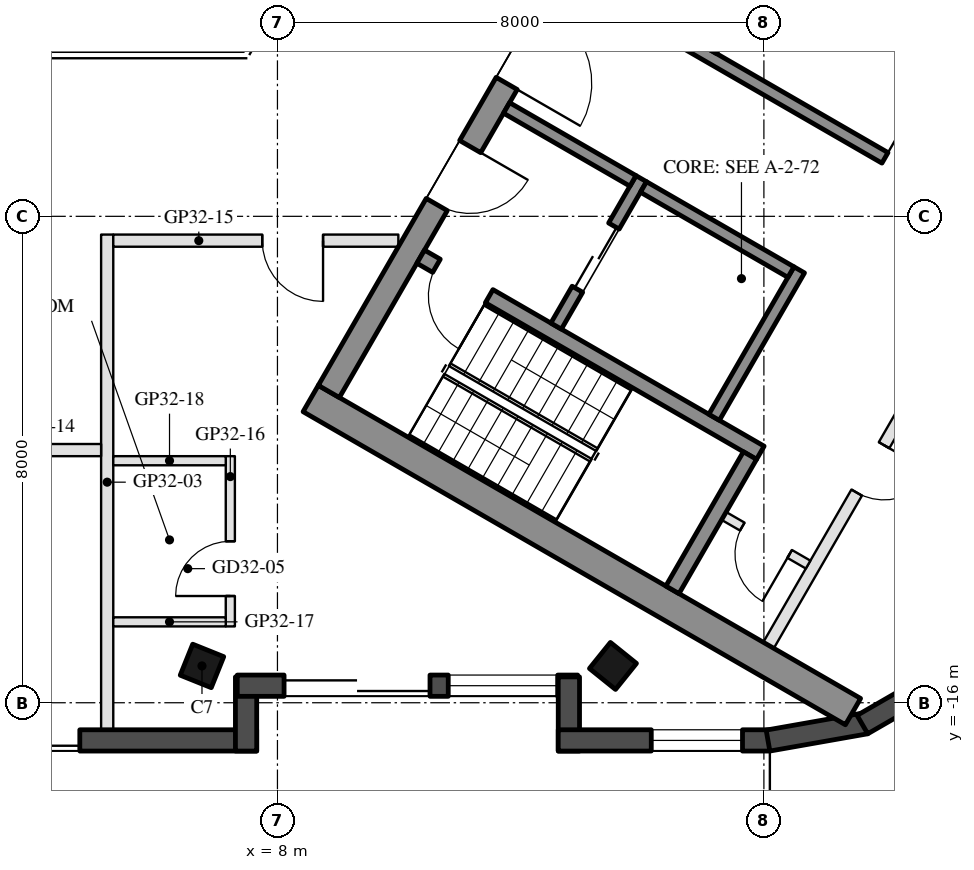
"""IFC4 building model, lengths in metres.
Left out: names, types, materials, properties, quantities, classifications, styles, units other than length and angle.
Written with IfcOpenShell. Run it as: python <this file> out.ifc"""

import sys

from ifc_helpers import new_model, si_unit, direction, frame, frame_2d, origin, origin_2d, place, context, subcontext, project, spatial, rectangle, hollow_rectangle, extrude, boolean, halfspace, element, fill, save


model = new_model("IFC4")
c1 = context("Model", 3, precision=1e-05, world=origin(), true_north=direction((0.0, 1.0)))
c2 = subcontext(c1, "Body", "Model", "MODEL_VIEW")
j1 = project(units=[si_unit("LENGTHUNIT", "METRE"), si_unit("PLANEANGLEUNIT", "RADIAN")], contexts=[c1])
p1 = place(None, origin())
s1 = spatial("IfcSite", under=j1, at=p1, CompositionType="ELEMENT")
p2 = place(p1, origin())
s2 = spatial("IfcBuilding", under=s1, at=p2, CompositionType="ELEMENT")
p3 = place(p2, frame((0.0, 0.0, 309.6)))
s3 = spatial("IfcBuildingStorey", under=s2, at=p3, CompositionType="ELEMENT", Elevation=309.6)
p4 = place(p3, frame((6.759, -15.395, 0.0), z_axis=(-0.060805602285, 0.151232777417, 0.986626234075), x_axis=(0.998137511125, 0.004342411053, 0.060849423591)))
e1 = element("IfcColumn", 1, at=p4, inside=s3, PredefinedType="COLUMN", context=c2, shape_type="SweptSolid", body=[
    boolean("DIFFERENCE", boolean("DIFFERENCE", extrude(hollow_rectangle(XDim=0.55, YDim=0.55, WallThickness=0.025, at=origin_2d()), origin(), (0.0, 0.0, 1.0), 3.75), halfspace(frame((0.0, 0.0, 0.034), z_axis=(0.0, 0.0, 1.0), x_axis=(1.0, 0.0, 0.0)), True)), halfspace(frame((0.0, 0.0, 3.716), z_axis=(0.0, 0.0, 1.0), x_axis=(1.0, 0.0, 0.0)), False)),
])
p5 = place(p3, frame((13.518, -15.395, 0.0), z_axis=(-0.121069901949, 0.150398600122, 0.981184151892), x_axis=(0.992601568988, 0.00920533993, 0.121067695767)))
e2 = element("IfcColumn", 2, at=p5, inside=s3, PredefinedType="COLUMN", context=c2, shape_type="SweptSolid", body=[
    boolean("DIFFERENCE", boolean("DIFFERENCE", extrude(hollow_rectangle(XDim=0.55, YDim=0.55, WallThickness=0.025, at=origin_2d()), origin(), (0.0, 0.0, 1.0), 3.771), halfspace(frame((0.0, 0.0, 0.04), z_axis=(0.0, 0.0, 1.0), x_axis=(1.0, 0.0, 0.0)), True)), halfspace(frame((0.0, 0.0, 3.731), z_axis=(0.0, 0.0, 1.0), x_axis=(1.0, 0.0, 0.0)), False)),
])
p6 = place(p3, frame((-0.9, -16.62, 0.0), z_axis=(0.0, 0.0, 1.0), x_axis=(1.0, 0.0, 0.0)))
e3 = element("IfcWall", 3, at=p6, inside=s3, PredefinedType="SOLIDWALL", context=c2, shape_type="SweptSolid", body=[
    extrude(rectangle(XDim=8.559, YDim=0.35, at=frame_2d((4.279, 0.0))), origin(), (0.0, 0.0, 1.0), 3.55),
])
p7 = place(p6, frame((3.85, 0.0, 0.0)))
e4 = element("IfcOpeningElement", 4, at=p7, cuts=e3, PredefinedType="OPENING", context=c2, shape_type="SweptSolid", body=[
    extrude(rectangle(XDim=1.8, YDim=2.4, at=frame_2d((0.9, 1.2))), frame((0.0, 0.185, 0.0), z_axis=(0.0, -1.0, 0.0), x_axis=(1.0, 0.0, 0.0)), (0.0, 0.0, 1.0), 0.37),
])
p8 = place(p6, frame((1.528, 0.0, 0.3)))
e5 = element("IfcOpeningElement", 5, at=p8, cuts=e3, PredefinedType="OPENING", context=c2, shape_type="SweptSolid", body=[
    extrude(rectangle(XDim=2.0, YDim=2.65, at=frame_2d((1.0, 1.325))), frame((0.0, 0.185, 0.0), z_axis=(0.0, -1.0, 0.0), x_axis=(1.0, 0.0, 0.0)), (0.0, 0.0, 1.0), 0.37),
])
p9 = place(p3, frame((7.484, -16.795, 0.0), z_axis=(0.0, 0.0, 1.0), x_axis=(0.0, 1.0, 0.0)))
e6 = element("IfcWall", 6, at=p9, inside=s3, PredefinedType="SOLIDWALL", context=c2, shape_type="SweptSolid", body=[
    extrude(rectangle(XDim=1.22, YDim=0.35, at=frame_2d((0.61, 0.0))), origin(), (0.0, 0.0, 1.0), 3.55),
])
p10 = place(p3, frame((7.339, -15.719, 0.0), z_axis=(0.0, 0.0, 1.0), x_axis=(1.0, 0.0, 0.0)))
e7 = element("IfcWall", 7, at=p10, inside=s3, PredefinedType="SOLIDWALL", context=c2, shape_type="SweptSolid", body=[
    extrude(rectangle(XDim=5.599, YDim=0.35, at=frame_2d((2.799, 0.0))), origin(), (0.0, 0.0, 1.0), 3.55),
])
p11 = place(p10, frame((0.77, 0.0, 0.0)))
e8 = element("IfcOpeningElement", 8, at=p11, cuts=e7, PredefinedType="OPENING", context=c2, shape_type="SweptSolid", body=[
    extrude(rectangle(XDim=2.4, YDim=2.4, at=frame_2d((1.2, 1.2))), frame((0.0, 0.185, 0.0), z_axis=(0.0, -1.0, 0.0), x_axis=(1.0, 0.0, 0.0)), (0.0, 0.0, 1.0), 0.37),
])
p12 = place(p10, frame((3.47, 0.0, 0.3)))
e9 = element("IfcOpeningElement", 9, at=p12, cuts=e7, PredefinedType="OPENING", context=c2, shape_type="SweptSolid", body=[
    extrude(rectangle(XDim=1.8, YDim=2.65, at=frame_2d((0.9, 1.325))), frame((0.0, 0.185, 0.0), z_axis=(0.0, -1.0, 0.0), x_axis=(1.0, 0.0, 0.0)), (0.0, 0.0, 1.0), 0.37),
])
p13 = place(p3, frame((12.793, -15.575, 0.0), z_axis=(0.0, 0.0, 1.0), x_axis=(0.0, -1.0, 0.0)))
e10 = element("IfcWall", 10, at=p13, inside=s3, PredefinedType="SOLIDWALL", context=c2, shape_type="SweptSolid", body=[
    extrude(rectangle(XDim=1.22, YDim=0.35, at=frame_2d((0.61, 0.0))), origin(), (0.0, 0.0, 1.0), 3.55),
])
p14 = place(p3, frame((12.618, -16.62, 0.0), z_axis=(0.0, 0.0, 1.0), x_axis=(1.0, 0.0, 0.0)))
e11 = element("IfcWall", 11, at=p14, inside=s3, PredefinedType="SOLIDWALL", context=c2, shape_type="SweptSolid", body=[
    extrude(rectangle(XDim=3.48, YDim=0.35, at=frame_2d((1.74, 0.0))), origin(), (0.0, 0.0, 1.0), 3.55),
])
p15 = place(p14, frame((1.53, 0.0, 0.3)))
e12 = element("IfcOpeningElement", 12, at=p15, cuts=e11, PredefinedType="OPENING", context=c2, shape_type="SweptSolid", body=[
    extrude(rectangle(XDim=1.5, YDim=2.65, at=frame_2d((0.75, 1.325))), frame((0.0, 0.185, 0.0), z_axis=(0.0, -1.0, 0.0), x_axis=(1.0, 0.0, 0.0)), (0.0, 0.0, 1.0), 0.37),
])
p16 = place(p3, frame((16.068, -16.622, 0.0), z_axis=(0.0, 0.0, 1.0), x_axis=(0.98479107762, 0.173742721977, 0.0)))
e13 = element("IfcWall", 13, at=p16, inside=s3, PredefinedType="SOLIDWALL", context=c2, shape_type="SweptSolid", body=[
    extrude(rectangle(XDim=1.634, YDim=0.35, at=frame_2d((0.817, 0.0))), origin(), (0.0, 0.0, 1.0), 3.55),
])
p17 = place(p3, frame((17.62, -16.359, 0.0), z_axis=(0.0, 0.0, 1.0), x_axis=(0.866083589932, 0.499899205091, 0.0)))
e14 = element("IfcWall", 14, at=p17, inside=s3, PredefinedType="SOLIDWALL", context=c2, shape_type="SweptSolid", body=[
    extrude(rectangle(XDim=1.634, YDim=0.35, at=frame_2d((0.817, 0.0))), origin(), (0.0, 0.0, 1.0), 3.55),
])
p18 = place(p3, frame((22.442, -5.632, 0.0), z_axis=(0.0, 0.0, 1.0), x_axis=(-0.499983205548, 0.866035099848, 0.0)))
e15 = element("IfcWall", 15, at=p18, inside=s3, PredefinedType="SOLIDWALL", context=c2, shape_type="SweptSolid", body=[
    extrude(rectangle(XDim=10.239, YDim=0.35, at=frame_2d((5.12, 0.0))), origin(), (0.0, 0.0, 1.0), 3.55),
])
p19 = place(p18, frame((6.311, 0.0, 0.0)))
e16 = element("IfcOpeningElement", 16, at=p19, cuts=e15, PredefinedType="OPENING", context=c2, shape_type="SweptSolid", body=[
    extrude(rectangle(XDim=2.4, YDim=2.4, at=frame_2d((1.2, 1.2))), frame((0.0, 0.185, 0.0), z_axis=(0.0, -1.0, 0.0), x_axis=(1.0, 0.0, 0.0)), (0.0, 0.0, 1.0), 0.37),
])
p20 = place(p18, frame((3.667, 0.0, 0.3)))
e17 = element("IfcOpeningElement", 17, at=p20, cuts=e15, PredefinedType="OPENING", context=c2, shape_type="SweptSolid", body=[
    extrude(rectangle(XDim=2.3, YDim=2.65, at=frame_2d((1.15, 1.325))), frame((0.0, 0.185, 0.0), z_axis=(0.0, -1.0, 0.0), x_axis=(1.0, 0.0, 0.0)), (0.0, 0.0, 1.0), 0.37),
])
for number, where, z_axis, x_axis in (
    (18, (8.547, -10.997, 0.0), (0.0, 0.0, 1.0), (0.866, -0.5, 0.0)),
    (19, (13.797, -1.903, 0.0), (0.0, 0.0, 1.0), (0.866, -0.5, 0.0)),
):
    element("IfcWall", number, at=place(p3, frame(where, z_axis=z_axis, x_axis=x_axis)), inside=s3, PredefinedType="SHEAR", context=c2, shape_type="SweptSolid", body=[
        extrude(rectangle(XDim=10.298, YDim=0.5, at=frame_2d((5.149, 0.0))), origin(), (0.0, 0.0, 1.0), 3.5),
    ])
p21 = place(p3, frame((8.845, -10.88, 0.0), z_axis=(0.0, 0.0, 1.0), x_axis=(0.500004234368, 0.866022959057, 0.0)))
e20 = element("IfcWall", 20, at=p21, inside=s3, PredefinedType="SHEAR", context=c2, shape_type="SweptSolid", body=[
    extrude(rectangle(XDim=10.0, YDim=0.4, at=frame_2d((5.0, 0.0))), origin(), (0.0, 0.0, 1.0), 3.5),
])
p22 = place(p21, frame((3.55, 0.0, 0.0)))
e21 = element("IfcOpeningElement", 21, at=p22, cuts=e20, PredefinedType="OPENING", context=c2, shape_type="SweptSolid", body=[
    extrude(rectangle(XDim=1.1, YDim=2.1, at=frame_2d((0.55, 1.05))), frame((0.0, 0.21, 0.0), z_axis=(0.0, -1.0, 0.0), x_axis=(1.0, 0.0, 0.0)), (0.0, 0.0, 1.0), 0.42),
])
p23 = place(p21, frame((5.85, 0.0, 0.0)))
e22 = element("IfcOpeningElement", 22, at=p23, cuts=e20, PredefinedType="OPENING", context=c2, shape_type="SweptSolid", body=[
    extrude(rectangle(XDim=1.4, YDim=2.1, at=frame_2d((0.7, 1.05))), frame((0.0, 0.21, 0.0), z_axis=(0.0, -1.0, 0.0), x_axis=(1.0, 0.0, 0.0)), (0.0, 0.0, 1.0), 0.42),
])
p24 = place(p3, frame((10.356, -8.664, 0.0), z_axis=(0.0, 0.0, 1.0), x_axis=(0.866028629588, -0.499994412703, 0.0)))
e23 = element("IfcWall", 23, at=p24, inside=s3, PredefinedType="SHEAR", context=c2, shape_type="SweptSolid", body=[
    extrude(rectangle(XDim=6.45, YDim=0.25, at=frame_2d((3.225, 0.0))), origin(), (0.0, 0.0, 1.0), 3.5),
])
p25 = place(p24, frame((0.3, 0.0, 0.0)))
e24 = element("IfcOpeningElement", 24, at=p25, cuts=e23, PredefinedType="OPENING", context=c2, shape_type="SweptSolid", body=[
    extrude(rectangle(XDim=1.0, YDim=2.1, at=frame_2d((0.5, 1.05))), frame((0.0, 0.135, 0.0), z_axis=(0.0, -1.0, 0.0), x_axis=(1.0, 0.0, 0.0)), (0.0, 0.0, 1.0), 0.27),
])
p26 = place(p3, frame((14.496, -14.143, 0.0), z_axis=(0.0, 0.0, 1.0), x_axis=(0.500062241894, 0.865989465428, 0.0)))
e25 = element("IfcWall", 25, at=p26, inside=s3, PredefinedType="SHEAR", context=c2, shape_type="SweptSolid", body=[
    extrude(rectangle(XDim=2.55, YDim=0.25, at=frame_2d((1.275, 0.0))), origin(), (0.0, 0.0, 1.0), 3.5),
])
p27 = place(p3, frame((15.181, -11.305, 0.0), z_axis=(0.0, 0.0, 1.0), x_axis=(0.49994636267, 0.866056369097, 0.0)))
e26 = element("IfcWall", 26, at=p27, inside=s3, PredefinedType="SHEAR", context=c2, shape_type="SweptSolid", body=[
    extrude(rectangle(XDim=2.8, YDim=0.2, at=frame_2d((1.4, 0.0))), origin(), (0.0, 0.0, 1.0), 3.5),
])
p28 = place(p3, frame((12.583, -9.805, 0.0), z_axis=(0.0, 0.0, 1.0), x_axis=(0.49994636267, 0.866056369097, 0.0)))
e27 = element("IfcWall", 27, at=p28, inside=s3, PredefinedType="SHEAR", context=c2, shape_type="SweptSolid", body=[
    extrude(rectangle(XDim=2.8, YDim=0.2, at=frame_2d((1.4, 0.0))), origin(), (0.0, 0.0, 1.0), 3.5),
])
p29 = place(p28, frame((0.7, 0.0, 0.0)))
e28 = element("IfcOpeningElement", 28, at=p29, cuts=e27, PredefinedType="OPENING", context=c2, shape_type="SweptSolid", body=[
    extrude(rectangle(XDim=1.2, YDim=2.1, at=frame_2d((0.6, 1.05))), frame((0.0, 0.11, 0.0), z_axis=(0.0, -1.0, 0.0), x_axis=(1.0, 0.0, 0.0)), (0.0, 0.0, 1.0), 0.22),
])
p30 = place(p3, frame((11.768, -6.217, 0.0), z_axis=(0.0, 0.0, 1.0), x_axis=(0.866050077142, -0.499957262057, 0.0)))
e29 = element("IfcWall", 29, at=p30, inside=s3, PredefinedType="SHEAR", context=c2, shape_type="SweptSolid", body=[
    extrude(rectangle(XDim=2.4, YDim=0.2, at=frame_2d((1.2, 0.0))), origin(), (0.0, 0.0, 1.0), 3.5),
])
p31 = place(p3, frame((14.02, -7.517, 0.0), z_axis=(0.0, 0.0, 1.0), x_axis=(0.866034573852, -0.49998411664, 0.0)))
e30 = element("IfcWall", 30, at=p31, inside=s3, PredefinedType="SHEAR", context=c2, shape_type="SweptSolid", body=[
    extrude(rectangle(XDim=2.8, YDim=0.2, at=frame_2d((1.4, 0.0))), origin(), (0.0, 0.0, 1.0), 3.5),
])
p32 = place(p3, frame((12.968, -4.138, 0.0), z_axis=(0.0, 0.0, 1.0), x_axis=(0.866028328073, -0.49999493495, 0.0)))
e31 = element("IfcWall", 31, at=p32, inside=s3, PredefinedType="SHEAR", context=c2, shape_type="SweptSolid", body=[
    extrude(rectangle(XDim=10.16, YDim=0.2, at=frame_2d((5.08, 0.0))), origin(), (0.0, 0.0, 1.0), 3.5),
])
p33 = place(p32, frame((0.62, 0.0, 0.0)))
e32 = element("IfcOpeningElement", 32, at=p33, cuts=e31, PredefinedType="OPENING", context=c2, shape_type="SweptSolid", body=[
    extrude(rectangle(XDim=1.1, YDim=2.1, at=frame_2d((0.55, 1.05))), frame((0.0, 0.11, 0.0), z_axis=(0.0, -1.0, 0.0), x_axis=(1.0, 0.0, 0.0)), (0.0, 0.0, 1.0), 0.22),
])
p34 = place(p32, frame((5.8, 0.0, 0.0)))
e33 = element("IfcOpeningElement", 33, at=p34, cuts=e31, PredefinedType="OPENING", context=c2, shape_type="SweptSolid", body=[
    extrude(rectangle(XDim=0.9, YDim=2.1, at=frame_2d((0.45, 1.05))), frame((0.0, 0.11, 0.0), z_axis=(0.0, -1.0, 0.0), x_axis=(1.0, 0.0, 0.0)), (0.0, 0.0, 1.0), 0.22),
])
p35 = place(p3, frame((15.131, -5.272, 0.0), z_axis=(0.0, 0.0, 1.0), x_axis=(0.499972520799, 0.866041268327, 0.0)))
e34 = element("IfcWall", 34, at=p35, inside=s3, PredefinedType="SHEAR", context=c2, shape_type="SweptSolid", body=[
    extrude(rectangle(XDim=2.0, YDim=0.2, at=frame_2d((1.0, 0.0))), origin(), (0.0, 0.0, 1.0), 3.5),
])
p36 = place(p3, frame((16.076, -15.055, 0.0), z_axis=(0.0, 0.0, 1.0), x_axis=(0.499995103361, 0.866028230842, 0.0)))
e35 = element("IfcWall", 35, at=p36, inside=s3, PredefinedType="PARTITIONING", context=c2, shape_type="SweptSolid", body=[
    extrude(rectangle(XDim=5.4, YDim=0.2, at=frame_2d((2.7, 0.0))), origin(), (0.0, 0.0, 1.0), 3.5),
])
p37 = place(p36, frame((2.9, 0.0, 0.0)))
e36 = element("IfcOpeningElement", 36, at=p37, cuts=e35, PredefinedType="OPENING", context=c2, shape_type="SweptSolid", body=[
    extrude(rectangle(XDim=0.9, YDim=2.1, at=frame_2d((0.45, 1.05))), frame((0.0, 0.11, 0.0), z_axis=(0.0, -1.0, 0.0), x_axis=(1.0, 0.0, 0.0)), (0.0, 0.0, 1.0), 0.22),
])
p38 = place(p3, frame((15.342, -12.928, 0.0), z_axis=(0.0, 0.0, 1.0), x_axis=(0.865989903783, -0.500061482766, 0.0)))
e37 = element("IfcWall", 37, at=p38, inside=s3, PredefinedType="PARTITIONING", context=c2, shape_type="SweptSolid", body=[
    extrude(rectangle(XDim=1.6, YDim=0.15, at=frame_2d((0.8, 0.0))), origin(), (0.0, 0.0, 1.0), 3.5),
])
p39 = place(p38, frame((0.35, 0.0, 0.0)))
e38 = element("IfcOpeningElement", 38, at=p39, cuts=e37, PredefinedType="OPENING", context=c2, shape_type="SweptSolid", body=[
    extrude(rectangle(XDim=0.9, YDim=2.1, at=frame_2d((0.45, 1.05))), frame((0.0, 0.085, 0.0), z_axis=(0.0, -1.0, 0.0), x_axis=(1.0, 0.0, 0.0)), (0.0, 0.0, 1.0), 0.17),
])
p40 = place(p3, frame((5.2, -16.445, 0.0), z_axis=(0.0, 0.0, 1.0), x_axis=(0.0, 1.0, 0.0)))
e39 = element("IfcWall", 39, at=p40, inside=s3, PredefinedType="PARTITIONING", context=c2, shape_type="SweptSolid", body=[
    extrude(rectangle(XDim=8.145, YDim=0.2, at=frame_2d((4.072, 0.0))), origin(), (0.0, 0.0, 1.0), 3.1),
])
p41 = place(p3, frame((5.1, -11.844, 0.0), z_axis=(0.0, 0.0, 1.0), x_axis=(-1.0, 0.0, 0.0)))
e40 = element("IfcWall", 40, at=p41, inside=s3, PredefinedType="PARTITIONING", context=c2, shape_type="SweptSolid", body=[
    extrude(rectangle(XDim=5.0, YDim=0.2, at=frame_2d((2.5, 0.0))), origin(), (0.0, 0.0, 1.0), 3.1),
])
p42 = place(p41, frame((2.0, 0.0, 0.0)))
e41 = element("IfcOpeningElement", 41, at=p42, cuts=e40, PredefinedType="OPENING", context=c2, shape_type="SweptSolid", body=[
    extrude(rectangle(XDim=1.0, YDim=2.1, at=frame_2d((0.5, 1.05))), frame((0.0, 0.11, 0.0), z_axis=(0.0, -1.0, 0.0), x_axis=(1.0, 0.0, 0.0)), (0.0, 0.0, 1.0), 0.22),
])
p43 = place(p3, frame((9.988, -8.4, 0.0), z_axis=(0.0, 0.0, 1.0), x_axis=(-1.0, 0.0, 0.0)))
e42 = element("IfcWall", 42, at=p43, inside=s3, PredefinedType="PARTITIONING", context=c2, shape_type="SweptSolid", body=[
    extrude(rectangle(XDim=4.688, YDim=0.2, at=frame_2d((2.344, 0.0))), origin(), (0.0, 0.0, 1.0), 3.1),
])
p44 = place(p43, frame((1.238, 0.0, 0.0)))
e43 = element("IfcOpeningElement", 43, at=p44, cuts=e42, PredefinedType="OPENING", context=c2, shape_type="SweptSolid", body=[
    extrude(rectangle(XDim=1.0, YDim=2.1, at=frame_2d((0.5, 1.05))), frame((0.0, 0.11, 0.0), z_axis=(0.0, -1.0, 0.0), x_axis=(1.0, 0.0, 0.0)), (0.0, 0.0, 1.0), 0.22),
])
p45 = place(p3, frame((7.225, -14.745, 0.0), z_axis=(0.0, 0.0, 1.0), x_axis=(0.0, 1.0, 0.0)))
e44 = element("IfcWall", 44, at=p45, inside=s3, PredefinedType="PARTITIONING", context=c2, shape_type="SweptSolid", body=[
    extrude(rectangle(XDim=2.8, YDim=0.15, at=frame_2d((1.4, 0.0))), origin(), (0.0, 0.0, 1.0), 3.1),
])
p46 = place(p45, frame((0.5, 0.0, 0.0)))
e45 = element("IfcOpeningElement", 45, at=p46, cuts=e44, PredefinedType="OPENING", context=c2, shape_type="SweptSolid", body=[
    extrude(rectangle(XDim=0.9, YDim=2.1, at=frame_2d((0.45, 1.05))), frame((0.0, 0.085, 0.0), z_axis=(0.0, -1.0, 0.0), x_axis=(1.0, 0.0, 0.0)), (0.0, 0.0, 1.0), 0.17),
])
for number, where, z_axis, x_axis in (
    (46, (5.3, -14.67, 0.0), (0.0, 0.0, 1.0), (1.0, 0.0, 0.0)),
    (47, (5.3, -12.02, 0.0), (0.0, 0.0, 1.0), (1.0, 0.0, 0.0)),
):
    element("IfcWall", number, at=place(p3, frame(where, z_axis=z_axis, x_axis=x_axis)), inside=s3, PredefinedType="PARTITIONING", context=c2, shape_type="SweptSolid", body=[
        extrude(rectangle(XDim=1.85, YDim=0.15, at=frame_2d((0.925, 0.0))), origin(), (0.0, 0.0, 1.0), 3.1),
    ])
p47 = place(p7, frame((1.8, 0.0, 0.0), z_axis=(0.0, 0.0, 1.0), x_axis=(-1.0, 0.0, 0.0)))
e48 = element("IfcDoor", 48, at=p47, inside=s3, OperationType="SLIDING_TO_LEFT", PredefinedType="DOOR", context=c2, shape_type="SweptSolid", body=[
    extrude(rectangle(XDim=1.8, YDim=2.4, at=frame_2d((0.9, 1.2))), frame((0.0, 0.025, 0.0), z_axis=(0.0, -1.0, 0.0), x_axis=(1.0, 0.0, 0.0)), (0.0, 0.0, 1.0), 0.05),
])
fill(e4, e48)
p48 = place(p11, frame((2.4, 0.0, 0.0), z_axis=(0.0, 0.0, 1.0), x_axis=(-1.0, 0.0, 0.0)))
e49 = element("IfcDoor", 49, at=p48, inside=s3, OperationType="SLIDING_TO_LEFT", PredefinedType="DOOR", context=c2, shape_type="SweptSolid", body=[
    extrude(rectangle(XDim=2.4, YDim=2.4, at=frame_2d((1.2, 1.2))), frame((0.0, 0.025, 0.0), z_axis=(0.0, -1.0, 0.0), x_axis=(1.0, 0.0, 0.0)), (0.0, 0.0, 1.0), 0.05),
])
fill(e8, e49)
p49 = place(p12, origin())
e50 = element("IfcWindow", 50, at=p49, inside=s3, PartitioningType="SINGLE_PANEL", PredefinedType="WINDOW", context=c2, shape_type="SweptSolid", body=[
    extrude(rectangle(XDim=1.8, YDim=2.65, at=frame_2d((0.9, 1.325))), frame((0.0, 0.03, 0.0), z_axis=(0.0, -1.0, 0.0), x_axis=(1.0, 0.0, 0.0)), (0.0, 0.0, 1.0), 0.06),
])
fill(e9, e50)
p50 = place(p15, origin())
e51 = element("IfcWindow", 51, at=p50, inside=s3, PartitioningType="SINGLE_PANEL", PredefinedType="WINDOW", context=c2, shape_type="SweptSolid", body=[
    extrude(rectangle(XDim=1.5, YDim=2.65, at=frame_2d((0.75, 1.325))), frame((0.0, 0.03, 0.0), z_axis=(0.0, -1.0, 0.0), x_axis=(1.0, 0.0, 0.0)), (0.0, 0.0, 1.0), 0.06),
])
fill(e12, e51)
p51 = place(p29, origin())
e52 = element("IfcDoor", 52, at=p51, inside=s3, OperationType="DOUBLE_DOOR_SLIDING", PredefinedType="DOOR", context=c2, shape_type="SweptSolid", body=[
    extrude(rectangle(XDim=1.2, YDim=2.1, at=frame_2d((0.6, 1.05))), frame((0.0, 0.025, 0.0), z_axis=(0.0, -1.0, 0.0), x_axis=(1.0, 0.0, 0.0)), (0.0, 0.0, 1.0), 0.05),
])
fill(e28, e52)
p52 = place(p39, frame((0.9, 0.0, 0.0), z_axis=(0.0, 0.0, 1.0), x_axis=(-1.0, 0.0, 0.0)))
e53 = element("IfcDoor", 53, at=p52, inside=s3, OperationType="SINGLE_SWING_LEFT", PredefinedType="DOOR", context=c2, shape_type="SweptSolid", body=[
    extrude(rectangle(XDim=0.9, YDim=2.1, at=frame_2d((0.45, 1.05))), frame((0.0, 0.025, 0.0), z_axis=(0.0, -1.0, 0.0), x_axis=(1.0, 0.0, 0.0)), (0.0, 0.0, 1.0), 0.05),
])
fill(e38, e53)
p53 = place(p34, origin())
e54 = element("IfcDoor", 54, at=p53, inside=s3, OperationType="SINGLE_SWING_LEFT", PredefinedType="DOOR", context=c2, shape_type="SweptSolid", body=[
    extrude(rectangle(XDim=0.9, YDim=2.1, at=frame_2d((0.45, 1.05))), frame((0.0, 0.025, 0.0), z_axis=(0.0, -1.0, 0.0), x_axis=(1.0, 0.0, 0.0)), (0.0, 0.0, 1.0), 0.05),
])
fill(e33, e54)
p54 = place(p37, frame((0.9, 0.0, 0.0), z_axis=(0.0, 0.0, 1.0), x_axis=(-1.0, 0.0, 0.0)))
e55 = element("IfcDoor", 55, at=p54, inside=s3, OperationType="SINGLE_SWING_LEFT", PredefinedType="DOOR", context=c2, shape_type="SweptSolid", body=[
    extrude(rectangle(XDim=0.9, YDim=2.1, at=frame_2d((0.45, 1.05))), frame((0.0, 0.025, 0.0), z_axis=(0.0, -1.0, 0.0), x_axis=(1.0, 0.0, 0.0)), (0.0, 0.0, 1.0), 0.05),
])
fill(e36, e55)
p55 = place(p22, frame((1.1, 0.0, 0.0), z_axis=(0.0, 0.0, 1.0), x_axis=(-1.0, 0.0, 0.0)))
e56 = element("IfcDoor", 56, at=p55, inside=s3, OperationType="SINGLE_SWING_LEFT", PredefinedType="DOOR", context=c2, shape_type="SweptSolid", body=[
    extrude(rectangle(XDim=1.1, YDim=2.1, at=frame_2d((0.55, 1.05))), frame((0.0, 0.025, 0.0), z_axis=(0.0, -1.0, 0.0), x_axis=(1.0, 0.0, 0.0)), (0.0, 0.0, 1.0), 0.05),
])
fill(e21, e56)
p56 = place(p23, frame((1.4, 0.0, 0.0), z_axis=(0.0, 0.0, 1.0), x_axis=(-1.0, 0.0, 0.0)))
e57 = element("IfcDoor", 57, at=p56, inside=s3, OperationType="DOUBLE_DOOR_SINGLE_SWING", PredefinedType="DOOR", context=c2, shape_type="SweptSolid", body=[
    extrude(rectangle(XDim=1.4, YDim=2.1, at=frame_2d((0.7, 1.05))), frame((0.0, 0.025, 0.0), z_axis=(0.0, -1.0, 0.0), x_axis=(1.0, 0.0, 0.0)), (0.0, 0.0, 1.0), 0.05),
])
fill(e22, e57)
p57 = place(p25, frame((1.0, 0.0, 0.0), z_axis=(0.0, 0.0, 1.0), x_axis=(-1.0, 0.0, 0.0)))
e58 = element("IfcDoor", 58, at=p57, inside=s3, OperationType="SINGLE_SWING_LEFT", PredefinedType="DOOR", context=c2, shape_type="SweptSolid", body=[
    extrude(rectangle(XDim=1.0, YDim=2.1, at=frame_2d((0.5, 1.05))), frame((0.0, 0.025, 0.0), z_axis=(0.0, -1.0, 0.0), x_axis=(1.0, 0.0, 0.0)), (0.0, 0.0, 1.0), 0.05),
])
fill(e24, e58)
p58 = place(p46, origin())
e59 = element("IfcDoor", 59, at=p58, inside=s3, OperationType="SINGLE_SWING_LEFT", PredefinedType="DOOR", context=c2, shape_type="SweptSolid", body=[
    extrude(rectangle(XDim=0.9, YDim=2.1, at=frame_2d((0.45, 1.05))), frame((0.0, 0.025, 0.0), z_axis=(0.0, -1.0, 0.0), x_axis=(1.0, 0.0, 0.0)), (0.0, 0.0, 1.0), 0.05),
])
fill(e45, e59)
p59 = place(p44, origin())
e60 = element("IfcDoor", 60, at=p59, inside=s3, OperationType="SINGLE_SWING_LEFT", PredefinedType="DOOR", context=c2, shape_type="SweptSolid", body=[
    extrude(rectangle(XDim=1.0, YDim=2.1, at=frame_2d((0.5, 1.05))), frame((0.0, 0.025, 0.0), z_axis=(0.0, -1.0, 0.0), x_axis=(1.0, 0.0, 0.0)), (0.0, 0.0, 1.0), 0.05),
])
fill(e43, e60)
save(model, sys.argv[1])
